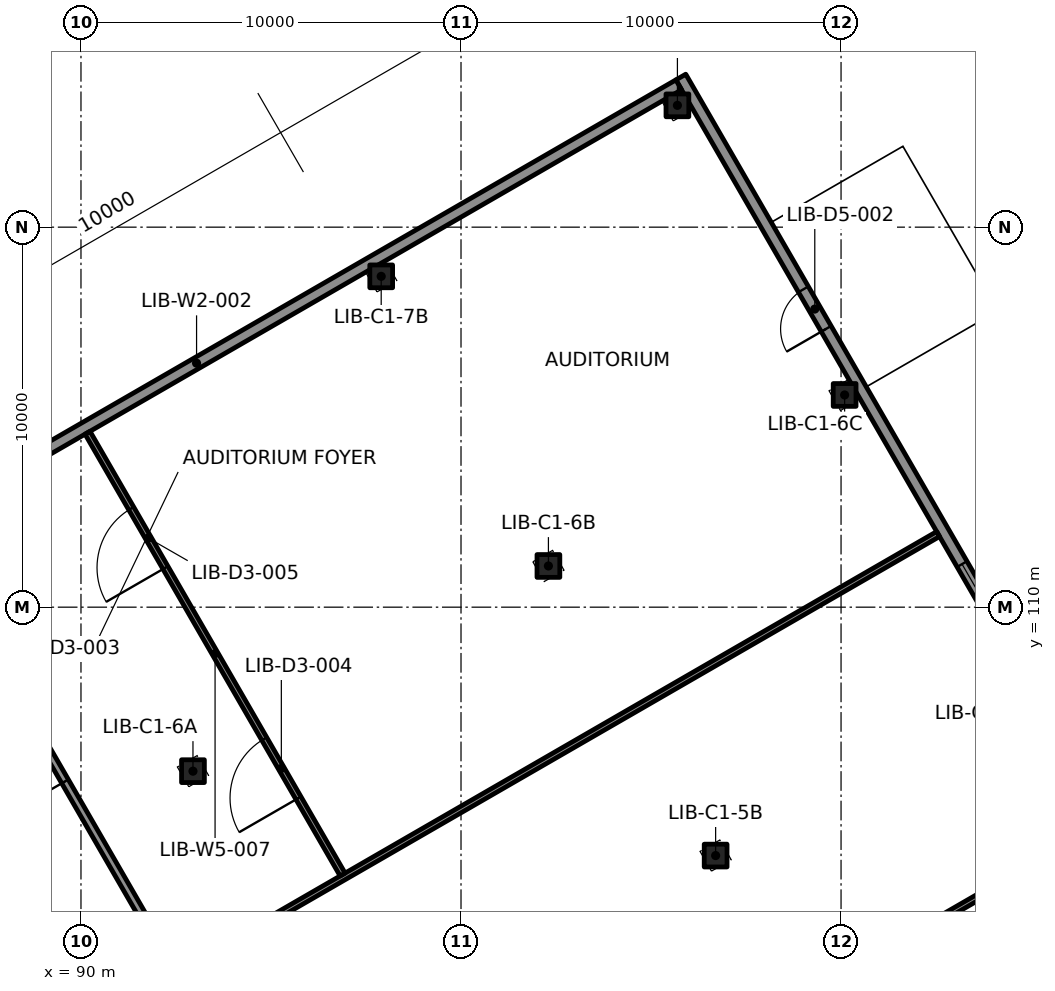
"""IFC4 building model, lengths in metres.
Left out: names, types, materials, properties, quantities, classifications, styles, units other than length and angle.
Written with IfcOpenShell. Run it as: python <this file> out.ifc"""

import sys

from ifc_helpers import new_model, si_unit, direction, frame, frame_2d, origin, origin_2d, place, context, subcontext, project, spatial, rectangle, extrude, element, fill, save


model = new_model("IFC4")
c1 = context("Model", 3, precision=1e-05, world=origin(), true_north=direction((0.0, 1.0)))
c2 = subcontext(c1, "Body", "Model", "MODEL_VIEW")
j1 = project(units=[si_unit("LENGTHUNIT", "METRE"), si_unit("PLANEANGLEUNIT", "RADIAN")], contexts=[c1])
p1 = place(None, origin())
s1 = spatial("IfcSite", under=j1, at=p1, CompositionType="ELEMENT")
p2 = place(p1, origin())
s2 = spatial("IfcBuilding", under=s1, at=p2, CompositionType="ELEMENT")
p3 = place(p2, origin())
s3 = spatial("IfcBuildingStorey", under=s2, at=p3, CompositionType="ELEMENT", Elevation=0.0)
p4 = place(p3, frame((107.504, 60.451, 0.0), z_axis=(0.0, 0.0, 1.0), x_axis=(-0.500000550228, 0.86602508611, 0.0)))
e1 = element("IfcWall", 1, at=p4, inside=s3, PredefinedType="SOLIDWALL", context=c2, shape_type="SweptSolid", body=[
    extrude(rectangle(XDim=57.704, YDim=0.3, at=frame_2d((28.852, 0.0))), origin(), (0.0, 0.0, 1.0), 7.7),
])
p5 = place(p4, frame((56.104, 0.0, 0.0)))
e2 = element("IfcOpeningElement", 2, at=p5, cuts=e1, PredefinedType="OPENING", context=c2, shape_type="SweptSolid", body=[
    extrude(rectangle(XDim=1.2, YDim=2.4, at=frame_2d((0.6, 1.2))), frame((0.0, 0.16, 0.0), z_axis=(0.0, -1.0, 0.0), x_axis=(1.0, 0.0, 0.0)), (0.0, 0.0, 1.0), 0.32),
])
p6 = place(p4, frame((1.552, 0.0, 0.15)))
e3 = element("IfcOpeningElement", 3, at=p6, cuts=e1, PredefinedType="OPENING", context=c2, shape_type="SweptSolid", body=[
    extrude(rectangle(XDim=2.1, YDim=5.4, at=frame_2d((1.05, 2.7))), frame((0.0, 0.16, 0.0), z_axis=(0.0, -1.0, 0.0), x_axis=(1.0, 0.0, 0.0)), (0.0, 0.0, 1.0), 0.32),
])
p7 = place(p4, frame((4.052, 0.0, 0.15)))
e4 = element("IfcOpeningElement", 4, at=p7, cuts=e1, PredefinedType="OPENING", context=c2, shape_type="SweptSolid", body=[
    extrude(rectangle(XDim=2.1, YDim=5.4, at=frame_2d((1.05, 2.7))), frame((0.0, 0.16, 0.0), z_axis=(0.0, -1.0, 0.0), x_axis=(1.0, 0.0, 0.0)), (0.0, 0.0, 1.0), 0.32),
])
p8 = place(p4, frame((6.552, 0.0, 0.15)))
e5 = element("IfcOpeningElement", 5, at=p8, cuts=e1, PredefinedType="OPENING", context=c2, shape_type="SweptSolid", body=[
    extrude(rectangle(XDim=2.1, YDim=5.4, at=frame_2d((1.05, 2.7))), frame((0.0, 0.16, 0.0), z_axis=(0.0, -1.0, 0.0), x_axis=(1.0, 0.0, 0.0)), (0.0, 0.0, 1.0), 0.32),
])
p9 = place(p4, frame((9.052, 0.0, 0.15)))
e6 = element("IfcOpeningElement", 6, at=p9, cuts=e1, PredefinedType="OPENING", context=c2, shape_type="SweptSolid", body=[
    extrude(rectangle(XDim=2.1, YDim=5.4, at=frame_2d((1.05, 2.7))), frame((0.0, 0.16, 0.0), z_axis=(0.0, -1.0, 0.0), x_axis=(1.0, 0.0, 0.0)), (0.0, 0.0, 1.0), 0.32),
])
p10 = place(p4, frame((11.552, 0.0, 0.15)))
e7 = element("IfcOpeningElement", 7, at=p10, cuts=e1, PredefinedType="OPENING", context=c2, shape_type="SweptSolid", body=[
    extrude(rectangle(XDim=2.1, YDim=5.4, at=frame_2d((1.05, 2.7))), frame((0.0, 0.16, 0.0), z_axis=(0.0, -1.0, 0.0), x_axis=(1.0, 0.0, 0.0)), (0.0, 0.0, 1.0), 0.32),
])
p11 = place(p4, frame((14.052, 0.0, 0.15)))
e8 = element("IfcOpeningElement", 8, at=p11, cuts=e1, PredefinedType="OPENING", context=c2, shape_type="SweptSolid", body=[
    extrude(rectangle(XDim=2.1, YDim=5.4, at=frame_2d((1.05, 2.7))), frame((0.0, 0.16, 0.0), z_axis=(0.0, -1.0, 0.0), x_axis=(1.0, 0.0, 0.0)), (0.0, 0.0, 1.0), 0.32),
])
p12 = place(p4, frame((16.552, 0.0, 0.15)))
e9 = element("IfcOpeningElement", 9, at=p12, cuts=e1, PredefinedType="OPENING", context=c2, shape_type="SweptSolid", body=[
    extrude(rectangle(XDim=2.1, YDim=5.4, at=frame_2d((1.05, 2.7))), frame((0.0, 0.16, 0.0), z_axis=(0.0, -1.0, 0.0), x_axis=(1.0, 0.0, 0.0)), (0.0, 0.0, 1.0), 0.32),
])
p13 = place(p4, frame((19.052, 0.0, 0.15)))
e10 = element("IfcOpeningElement", 10, at=p13, cuts=e1, PredefinedType="OPENING", context=c2, shape_type="SweptSolid", body=[
    extrude(rectangle(XDim=2.1, YDim=5.4, at=frame_2d((1.05, 2.7))), frame((0.0, 0.16, 0.0), z_axis=(0.0, -1.0, 0.0), x_axis=(1.0, 0.0, 0.0)), (0.0, 0.0, 1.0), 0.32),
])
p14 = place(p4, frame((21.552, 0.0, 0.15)))
e11 = element("IfcOpeningElement", 11, at=p14, cuts=e1, PredefinedType="OPENING", context=c2, shape_type="SweptSolid", body=[
    extrude(rectangle(XDim=2.1, YDim=5.4, at=frame_2d((1.05, 2.7))), frame((0.0, 0.16, 0.0), z_axis=(0.0, -1.0, 0.0), x_axis=(1.0, 0.0, 0.0)), (0.0, 0.0, 1.0), 0.32),
])
p15 = place(p4, frame((24.052, 0.0, 0.15)))
e12 = element("IfcOpeningElement", 12, at=p15, cuts=e1, PredefinedType="OPENING", context=c2, shape_type="SweptSolid", body=[
    extrude(rectangle(XDim=2.1, YDim=5.4, at=frame_2d((1.05, 2.7))), frame((0.0, 0.16, 0.0), z_axis=(0.0, -1.0, 0.0), x_axis=(1.0, 0.0, 0.0)), (0.0, 0.0, 1.0), 0.32),
])
p16 = place(p4, frame((26.552, 0.0, 0.15)))
e13 = element("IfcOpeningElement", 13, at=p16, cuts=e1, PredefinedType="OPENING", context=c2, shape_type="SweptSolid", body=[
    extrude(rectangle(XDim=2.1, YDim=5.4, at=frame_2d((1.05, 2.7))), frame((0.0, 0.16, 0.0), z_axis=(0.0, -1.0, 0.0), x_axis=(1.0, 0.0, 0.0)), (0.0, 0.0, 1.0), 0.32),
])
p17 = place(p4, frame((29.052, 0.0, 0.15)))
e14 = element("IfcOpeningElement", 14, at=p17, cuts=e1, PredefinedType="OPENING", context=c2, shape_type="SweptSolid", body=[
    extrude(rectangle(XDim=2.1, YDim=5.4, at=frame_2d((1.05, 2.7))), frame((0.0, 0.16, 0.0), z_axis=(0.0, -1.0, 0.0), x_axis=(1.0, 0.0, 0.0)), (0.0, 0.0, 1.0), 0.32),
])
p18 = place(p4, frame((31.552, 0.0, 0.15)))
e15 = element("IfcOpeningElement", 15, at=p18, cuts=e1, PredefinedType="OPENING", context=c2, shape_type="SweptSolid", body=[
    extrude(rectangle(XDim=2.1, YDim=5.4, at=frame_2d((1.05, 2.7))), frame((0.0, 0.16, 0.0), z_axis=(0.0, -1.0, 0.0), x_axis=(1.0, 0.0, 0.0)), (0.0, 0.0, 1.0), 0.32),
])
p19 = place(p4, frame((34.052, 0.0, 0.15)))
e16 = element("IfcOpeningElement", 16, at=p19, cuts=e1, PredefinedType="OPENING", context=c2, shape_type="SweptSolid", body=[
    extrude(rectangle(XDim=2.1, YDim=5.4, at=frame_2d((1.05, 2.7))), frame((0.0, 0.16, 0.0), z_axis=(0.0, -1.0, 0.0), x_axis=(1.0, 0.0, 0.0)), (0.0, 0.0, 1.0), 0.32),
])
p20 = place(p4, frame((36.552, 0.0, 0.15)))
e17 = element("IfcOpeningElement", 17, at=p20, cuts=e1, PredefinedType="OPENING", context=c2, shape_type="SweptSolid", body=[
    extrude(rectangle(XDim=2.1, YDim=5.4, at=frame_2d((1.05, 2.7))), frame((0.0, 0.16, 0.0), z_axis=(0.0, -1.0, 0.0), x_axis=(1.0, 0.0, 0.0)), (0.0, 0.0, 1.0), 0.32),
])
p21 = place(p4, frame((39.052, 0.0, 0.15)))
e18 = element("IfcOpeningElement", 18, at=p21, cuts=e1, PredefinedType="OPENING", context=c2, shape_type="SweptSolid", body=[
    extrude(rectangle(XDim=2.1, YDim=5.4, at=frame_2d((1.05, 2.7))), frame((0.0, 0.16, 0.0), z_axis=(0.0, -1.0, 0.0), x_axis=(1.0, 0.0, 0.0)), (0.0, 0.0, 1.0), 0.32),
])
p22 = place(p4, frame((41.552, 0.0, 0.15)))
e19 = element("IfcOpeningElement", 19, at=p22, cuts=e1, PredefinedType="OPENING", context=c2, shape_type="SweptSolid", body=[
    extrude(rectangle(XDim=2.1, YDim=5.4, at=frame_2d((1.05, 2.7))), frame((0.0, 0.16, 0.0), z_axis=(0.0, -1.0, 0.0), x_axis=(1.0, 0.0, 0.0)), (0.0, 0.0, 1.0), 0.32),
])
p23 = place(p4, frame((44.052, 0.0, 0.15)))
e20 = element("IfcOpeningElement", 20, at=p23, cuts=e1, PredefinedType="OPENING", context=c2, shape_type="SweptSolid", body=[
    extrude(rectangle(XDim=2.1, YDim=5.4, at=frame_2d((1.05, 2.7))), frame((0.0, 0.16, 0.0), z_axis=(0.0, -1.0, 0.0), x_axis=(1.0, 0.0, 0.0)), (0.0, 0.0, 1.0), 0.32),
])
p24 = place(p4, frame((46.552, 0.0, 0.15)))
e21 = element("IfcOpeningElement", 21, at=p24, cuts=e1, PredefinedType="OPENING", context=c2, shape_type="SweptSolid", body=[
    extrude(rectangle(XDim=2.1, YDim=5.4, at=frame_2d((1.05, 2.7))), frame((0.0, 0.16, 0.0), z_axis=(0.0, -1.0, 0.0), x_axis=(1.0, 0.0, 0.0)), (0.0, 0.0, 1.0), 0.32),
])
p25 = place(p4, frame((49.052, 0.0, 0.15)))
e22 = element("IfcOpeningElement", 22, at=p25, cuts=e1, PredefinedType="OPENING", context=c2, shape_type="SweptSolid", body=[
    extrude(rectangle(XDim=2.1, YDim=5.4, at=frame_2d((1.05, 2.7))), frame((0.0, 0.16, 0.0), z_axis=(0.0, -1.0, 0.0), x_axis=(1.0, 0.0, 0.0)), (0.0, 0.0, 1.0), 0.32),
])
p26 = place(p4, frame((51.552, 0.0, 0.15)))
e23 = element("IfcOpeningElement", 23, at=p26, cuts=e1, PredefinedType="OPENING", context=c2, shape_type="SweptSolid", body=[
    extrude(rectangle(XDim=2.1, YDim=5.4, at=frame_2d((1.05, 2.7))), frame((0.0, 0.16, 0.0), z_axis=(0.0, -1.0, 0.0), x_axis=(1.0, 0.0, 0.0)), (0.0, 0.0, 1.0), 0.32),
])
for number, where, z_axis, x_axis in (
    (24, (106.7, 103.463, -0.3), (0.0, 0.0, 1.0), (1.0, 0.0, 0.0)),
    (25, (92.947, 105.684, -0.3), (0.0, 0.0, 1.0), (1.0, 0.0, 0.0)),
    (26, (102.3, 111.084, -0.3), (0.0, 0.0, 1.0), (1.0, 0.0, 0.0)),
    (27, (110.094, 115.584, -0.3), (0.0, 0.0, 1.0), (1.0, 0.0, 0.0)),
    (28, (97.9, 118.705, -0.3), (0.0, 0.0, 1.0), (1.0, 0.0, 0.0)),
    (29, (105.694, 123.205, -0.3), (0.0, 0.0, 1.0), (1.0, 0.0, 0.0)),
):
    element("IfcColumn", number, at=place(p3, frame(where, z_axis=z_axis, x_axis=x_axis)), inside=s3, PredefinedType="COLUMN", context=c2, shape_type="SweptSolid", body=[
        extrude(rectangle(XDim=0.6, YDim=0.6, at=origin_2d()), origin(), (0.0, 0.0, 1.0), 7.94),
    ])
p27 = place(p3, frame((107.106, 62.36, 0.0), z_axis=(0.0, 0.0, 1.0), x_axis=(-0.49999992739, 0.866025445706, 0.0)))
e30 = element("IfcWall", 30, at=p27, inside=s3, PredefinedType="SOLIDWALL", context=c2, shape_type="SweptSolid", body=[
    extrude(rectangle(XDim=54.0, YDim=0.4, at=frame_2d((27.0, 0.0))), origin(), (0.0, 0.0, 1.0), 7.64),
])
p28 = place(p3, frame((132.784, 77.185, 0.0), z_axis=(0.0, 0.0, 1.0), x_axis=(-0.49999992739, 0.866025445706, 0.0)))
e31 = element("IfcWall", 31, at=p28, inside=s3, PredefinedType="SOLIDWALL", context=c2, shape_type="SweptSolid", body=[
    extrude(rectangle(XDim=54.0, YDim=0.3, at=frame_2d((27.0, 0.0))), origin(), (0.0, 0.0, 1.0), 7.64),
])
p29 = place(p28, frame((1.6, 0.0, 0.6)))
e32 = element("IfcOpeningElement", 32, at=p29, cuts=e31, PredefinedType="OPENING", context=c2, shape_type="SweptSolid", body=[
    extrude(rectangle(XDim=2.4, YDim=4.6, at=frame_2d((1.2, 2.3))), frame((0.0, 0.16, 0.0), z_axis=(0.0, -1.0, 0.0), x_axis=(1.0, 0.0, 0.0)), (0.0, 0.0, 1.0), 0.32),
])
p30 = place(p28, frame((6.0, 0.0, 0.6)))
e33 = element("IfcOpeningElement", 33, at=p30, cuts=e31, PredefinedType="OPENING", context=c2, shape_type="SweptSolid", body=[
    extrude(rectangle(XDim=2.4, YDim=4.6, at=frame_2d((1.2, 2.3))), frame((0.0, 0.16, 0.0), z_axis=(0.0, -1.0, 0.0), x_axis=(1.0, 0.0, 0.0)), (0.0, 0.0, 1.0), 0.32),
])
p31 = place(p28, frame((10.4, 0.0, 0.6)))
e34 = element("IfcOpeningElement", 34, at=p31, cuts=e31, PredefinedType="OPENING", context=c2, shape_type="SweptSolid", body=[
    extrude(rectangle(XDim=2.4, YDim=4.6, at=frame_2d((1.2, 2.3))), frame((0.0, 0.16, 0.0), z_axis=(0.0, -1.0, 0.0), x_axis=(1.0, 0.0, 0.0)), (0.0, 0.0, 1.0), 0.32),
])
p32 = place(p28, frame((14.8, 0.0, 0.6)))
e35 = element("IfcOpeningElement", 35, at=p32, cuts=e31, PredefinedType="OPENING", context=c2, shape_type="SweptSolid", body=[
    extrude(rectangle(XDim=2.4, YDim=4.6, at=frame_2d((1.2, 2.3))), frame((0.0, 0.16, 0.0), z_axis=(0.0, -1.0, 0.0), x_axis=(1.0, 0.0, 0.0)), (0.0, 0.0, 1.0), 0.32),
])
p33 = place(p28, frame((19.2, 0.0, 0.6)))
e36 = element("IfcOpeningElement", 36, at=p33, cuts=e31, PredefinedType="OPENING", context=c2, shape_type="SweptSolid", body=[
    extrude(rectangle(XDim=2.4, YDim=4.6, at=frame_2d((1.2, 2.3))), frame((0.0, 0.16, 0.0), z_axis=(0.0, -1.0, 0.0), x_axis=(1.0, 0.0, 0.0)), (0.0, 0.0, 1.0), 0.32),
])
p34 = place(p28, frame((23.6, 0.0, 0.6)))
e37 = element("IfcOpeningElement", 37, at=p34, cuts=e31, PredefinedType="OPENING", context=c2, shape_type="SweptSolid", body=[
    extrude(rectangle(XDim=2.4, YDim=4.6, at=frame_2d((1.2, 2.3))), frame((0.0, 0.16, 0.0), z_axis=(0.0, -1.0, 0.0), x_axis=(1.0, 0.0, 0.0)), (0.0, 0.0, 1.0), 0.32),
])
p35 = place(p28, frame((28.0, 0.0, 0.6)))
e38 = element("IfcOpeningElement", 38, at=p35, cuts=e31, PredefinedType="OPENING", context=c2, shape_type="SweptSolid", body=[
    extrude(rectangle(XDim=2.4, YDim=4.6, at=frame_2d((1.2, 2.3))), frame((0.0, 0.16, 0.0), z_axis=(0.0, -1.0, 0.0), x_axis=(1.0, 0.0, 0.0)), (0.0, 0.0, 1.0), 0.32),
])
p36 = place(p28, frame((32.4, 0.0, 0.6)))
e39 = element("IfcOpeningElement", 39, at=p36, cuts=e31, PredefinedType="OPENING", context=c2, shape_type="SweptSolid", body=[
    extrude(rectangle(XDim=2.4, YDim=4.6, at=frame_2d((1.2, 2.3))), frame((0.0, 0.16, 0.0), z_axis=(0.0, -1.0, 0.0), x_axis=(1.0, 0.0, 0.0)), (0.0, 0.0, 1.0), 0.32),
])
p37 = place(p28, frame((36.8, 0.0, 0.6)))
e40 = element("IfcOpeningElement", 40, at=p37, cuts=e31, PredefinedType="OPENING", context=c2, shape_type="SweptSolid", body=[
    extrude(rectangle(XDim=2.4, YDim=4.6, at=frame_2d((1.2, 2.3))), frame((0.0, 0.16, 0.0), z_axis=(0.0, -1.0, 0.0), x_axis=(1.0, 0.0, 0.0)), (0.0, 0.0, 1.0), 0.32),
])
p38 = place(p28, frame((46.35, 0.0, 0.0)))
e41 = element("IfcOpeningElement", 41, at=p38, cuts=e31, PredefinedType="OPENING", context=c2, shape_type="SweptSolid", body=[
    extrude(rectangle(XDim=1.2, YDim=2.2, at=frame_2d((0.6, 1.1))), frame((0.0, 0.16, 0.0), z_axis=(0.0, -1.0, 0.0), x_axis=(1.0, 0.0, 0.0)), (0.0, 0.0, 1.0), 0.32),
])
p39 = place(p3, frame((80.354, 109.095, 0.0), z_axis=(0.0, 0.0, 1.0), x_axis=(0.866026568746, 0.499997982221, 0.0)))
e42 = element("IfcWall", 42, at=p39, inside=s3, PredefinedType="SOLIDWALL", context=c2, shape_type="SweptSolid", body=[
    extrude(rectangle(XDim=29.3, YDim=0.3, at=frame_2d((14.65, 0.0))), origin(), (0.0, 0.0, 1.0), 7.64),
])
p40 = place(p39, frame((0.875, 0.0, 0.0)))
e43 = element("IfcOpeningElement", 43, at=p40, cuts=e42, PredefinedType="OPENING", context=c2, shape_type="SweptSolid", body=[
    extrude(rectangle(XDim=1.2, YDim=2.2, at=frame_2d((0.6, 1.1))), frame((0.0, 0.16, 0.0), z_axis=(0.0, -1.0, 0.0), x_axis=(1.0, 0.0, 0.0)), (0.0, 0.0, 1.0), 0.32),
])
p41 = place(p3, frame((94.93, 90.0, 0.0), z_axis=(0.0, 0.0, 1.0), x_axis=(-0.499997667785, 0.866026750285, 0.0)))
e44 = element("IfcWall", 44, at=p41, inside=s3, PredefinedType="PARTITIONING", context=c2, shape_type="SweptSolid", body=[
    extrude(rectangle(XDim=14.59, YDim=0.2, at=frame_2d((7.295, 0.0))), origin(), (0.0, 0.0, 1.0), 7.64),
])
p42 = place(p41, frame((1.235, 0.0, 0.0)))
e45 = element("IfcOpeningElement", 45, at=p42, cuts=e44, PredefinedType="OPENING", context=c2, shape_type="SweptSolid", body=[
    extrude(rectangle(XDim=1.0, YDim=2.1, at=frame_2d((0.5, 1.05))), frame((0.0, 0.11, 0.0), z_axis=(0.0, -1.0, 0.0), x_axis=(1.0, 0.0, 0.0)), (0.0, 0.0, 1.0), 0.22),
])
p43 = place(p41, frame((4.275, 0.0, 0.0)))
e46 = element("IfcOpeningElement", 46, at=p43, cuts=e44, PredefinedType="OPENING", context=c2, shape_type="SweptSolid", body=[
    extrude(rectangle(XDim=0.9, YDim=2.1, at=frame_2d((0.45, 1.05))), frame((0.0, 0.11, 0.0), z_axis=(0.0, -1.0, 0.0), x_axis=(1.0, 0.0, 0.0)), (0.0, 0.0, 1.0), 0.22),
])
p44 = place(p41, frame((9.825, 0.0, 0.0)))
e47 = element("IfcOpeningElement", 47, at=p44, cuts=e44, PredefinedType="OPENING", context=c2, shape_type="SweptSolid", body=[
    extrude(rectangle(XDim=0.9, YDim=2.1, at=frame_2d((0.45, 1.05))), frame((0.0, 0.11, 0.0), z_axis=(0.0, -1.0, 0.0), x_axis=(1.0, 0.0, 0.0)), (0.0, 0.0, 1.0), 0.22),
])
p45 = place(p3, frame((112.456, 65.794, 0.0), z_axis=(0.0, 0.0, 1.0), x_axis=(-0.499998559706, 0.866026235337, 0.0)))
e48 = element("IfcWall", 48, at=p45, inside=s3, PredefinedType="PARTITIONING", context=c2, shape_type="SweptSolid", body=[
    extrude(rectangle(XDim=53.4, YDim=0.2, at=frame_2d((26.7, 0.0))), origin(), (0.0, 0.0, 1.0), 7.64),
])
p46 = place(p45, frame((12.6, 0.0, 0.0)))
e49 = element("IfcOpeningElement", 49, at=p46, cuts=e48, PredefinedType="OPENING", context=c2, shape_type="SweptSolid", body=[
    extrude(rectangle(XDim=1.8, YDim=2.1, at=frame_2d((0.9, 1.05))), frame((0.0, 0.11, 0.0), z_axis=(0.0, -1.0, 0.0), x_axis=(1.0, 0.0, 0.0)), (0.0, 0.0, 1.0), 0.22),
])
p47 = place(p45, frame((25.8, 0.0, 0.0)))
e50 = element("IfcOpeningElement", 50, at=p47, cuts=e48, PredefinedType="OPENING", context=c2, shape_type="SweptSolid", body=[
    extrude(rectangle(XDim=1.8, YDim=2.1, at=frame_2d((0.9, 1.05))), frame((0.0, 0.11, 0.0), z_axis=(0.0, -1.0, 0.0), x_axis=(1.0, 0.0, 0.0)), (0.0, 0.0, 1.0), 0.22),
])
p48 = place(p45, frame((35.0, 0.0, 0.0)))
e51 = element("IfcOpeningElement", 51, at=p48, cuts=e48, PredefinedType="OPENING", context=c2, shape_type="SweptSolid", body=[
    extrude(rectangle(XDim=1.0, YDim=2.1, at=frame_2d((0.5, 1.05))), frame((0.0, 0.11, 0.0), z_axis=(0.0, -1.0, 0.0), x_axis=(1.0, 0.0, 0.0)), (0.0, 0.0, 1.0), 0.22),
])
p49 = place(p45, frame((45.75, 0.0, 0.0)))
e52 = element("IfcOpeningElement", 52, at=p49, cuts=e48, PredefinedType="OPENING", context=c2, shape_type="SweptSolid", body=[
    extrude(rectangle(XDim=1.8, YDim=2.1, at=frame_2d((0.9, 1.05))), frame((0.0, 0.11, 0.0), z_axis=(0.0, -1.0, 0.0), x_axis=(1.0, 0.0, 0.0)), (0.0, 0.0, 1.0), 0.22),
])
for number, where, z_axis, x_axis in (
    (53, (96.992, 92.778, 0.0), (0.0, 0.0, 1.0), (0.866, 0.5, 0.0)),
    (54, (92.592, 100.399, 0.0), (0.0, 0.0, 1.0), (0.866, 0.5, 0.0)),
):
    element("IfcWall", number, at=place(p3, frame(where, z_axis=z_axis, x_axis=x_axis)), inside=s3, PredefinedType="PARTITIONING", context=c2, shape_type="SweptSolid", body=[
        extrude(rectangle(XDim=23.05, YDim=0.15, at=frame_2d((11.525, 0.0))), origin(), (0.0, 0.0, 1.0), 7.64),
    ])
p50 = place(p3, frame((96.885, 102.964, 0.0), z_axis=(0.0, 0.0, 1.0), x_axis=(-0.500013677766, 0.866017506779, 0.0)))
e55 = element("IfcWall", 55, at=p50, inside=s3, PredefinedType="PARTITIONING", context=c2, shape_type="SweptSolid", body=[
    extrude(rectangle(XDim=13.425, YDim=0.15, at=frame_2d((6.712, 0.0))), origin(), (0.0, 0.0, 1.0), 7.64),
])
p51 = place(p50, frame((2.325, 0.0, 0.0)))
e56 = element("IfcOpeningElement", 56, at=p51, cuts=e55, PredefinedType="OPENING", context=c2, shape_type="SweptSolid", body=[
    extrude(rectangle(XDim=1.8, YDim=2.1, at=frame_2d((0.9, 1.05))), frame((0.0, 0.085, 0.0), z_axis=(0.0, -1.0, 0.0), x_axis=(1.0, 0.0, 0.0)), (0.0, 0.0, 1.0), 0.17),
])
p52 = place(p50, frame((9.325, 0.0, 0.0)))
e57 = element("IfcOpeningElement", 57, at=p52, cuts=e55, PredefinedType="OPENING", context=c2, shape_type="SweptSolid", body=[
    extrude(rectangle(XDim=1.8, YDim=2.1, at=frame_2d((0.9, 1.05))), frame((0.0, 0.085, 0.0), z_axis=(0.0, -1.0, 0.0), x_axis=(1.0, 0.0, 0.0)), (0.0, 0.0, 1.0), 0.17),
])
p53 = place(p37, origin())
e58 = element("IfcWindow", 58, at=p53, inside=s3, PartitioningType="SINGLE_PANEL", PredefinedType="WINDOW", context=c2, shape_type="SweptSolid", body=[
    extrude(rectangle(XDim=2.4, YDim=4.6, at=frame_2d((1.2, 2.3))), frame((0.0, 0.03, 0.0), z_axis=(0.0, -1.0, 0.0), x_axis=(1.0, 0.0, 0.0)), (0.0, 0.0, 1.0), 0.06),
])
fill(e40, e58)
p54 = place(p38, origin())
e59 = element("IfcDoor", 59, at=p54, inside=s3, OperationType="SINGLE_SWING_RIGHT", PredefinedType="DOOR", context=c2, shape_type="SweptSolid", body=[
    extrude(rectangle(XDim=1.2, YDim=2.2, at=frame_2d((0.6, 1.1))), frame((0.0, 0.025, 0.0), z_axis=(0.0, -1.0, 0.0), x_axis=(1.0, 0.0, 0.0)), (0.0, 0.0, 1.0), 0.05),
])
fill(e41, e59)
p55 = place(p49, origin())
e60 = element("IfcDoor", 60, at=p55, inside=s3, OperationType="DOUBLE_DOOR_SINGLE_SWING", PredefinedType="DOOR", context=c2, shape_type="SweptSolid", body=[
    extrude(rectangle(XDim=1.8, YDim=2.1, at=frame_2d((0.9, 1.05))), frame((0.0, 0.025, 0.0), z_axis=(0.0, -1.0, 0.0), x_axis=(1.0, 0.0, 0.0)), (0.0, 0.0, 1.0), 0.05),
])
fill(e52, e60)
p56 = place(p51, origin())
e61 = element("IfcDoor", 61, at=p56, inside=s3, OperationType="DOUBLE_DOOR_SINGLE_SWING", PredefinedType="DOOR", context=c2, shape_type="SweptSolid", body=[
    extrude(rectangle(XDim=1.8, YDim=2.1, at=frame_2d((0.9, 1.05))), frame((0.0, 0.025, 0.0), z_axis=(0.0, -1.0, 0.0), x_axis=(1.0, 0.0, 0.0)), (0.0, 0.0, 1.0), 0.05),
])
fill(e56, e61)
p57 = place(p52, origin())
e62 = element("IfcDoor", 62, at=p57, inside=s3, OperationType="DOUBLE_DOOR_SINGLE_SWING", PredefinedType="DOOR", context=c2, shape_type="SweptSolid", body=[
    extrude(rectangle(XDim=1.8, YDim=2.1, at=frame_2d((0.9, 1.05))), frame((0.0, 0.025, 0.0), z_axis=(0.0, -1.0, 0.0), x_axis=(1.0, 0.0, 0.0)), (0.0, 0.0, 1.0), 0.05),
])
fill(e57, e62)
save(model, sys.argv[1])
